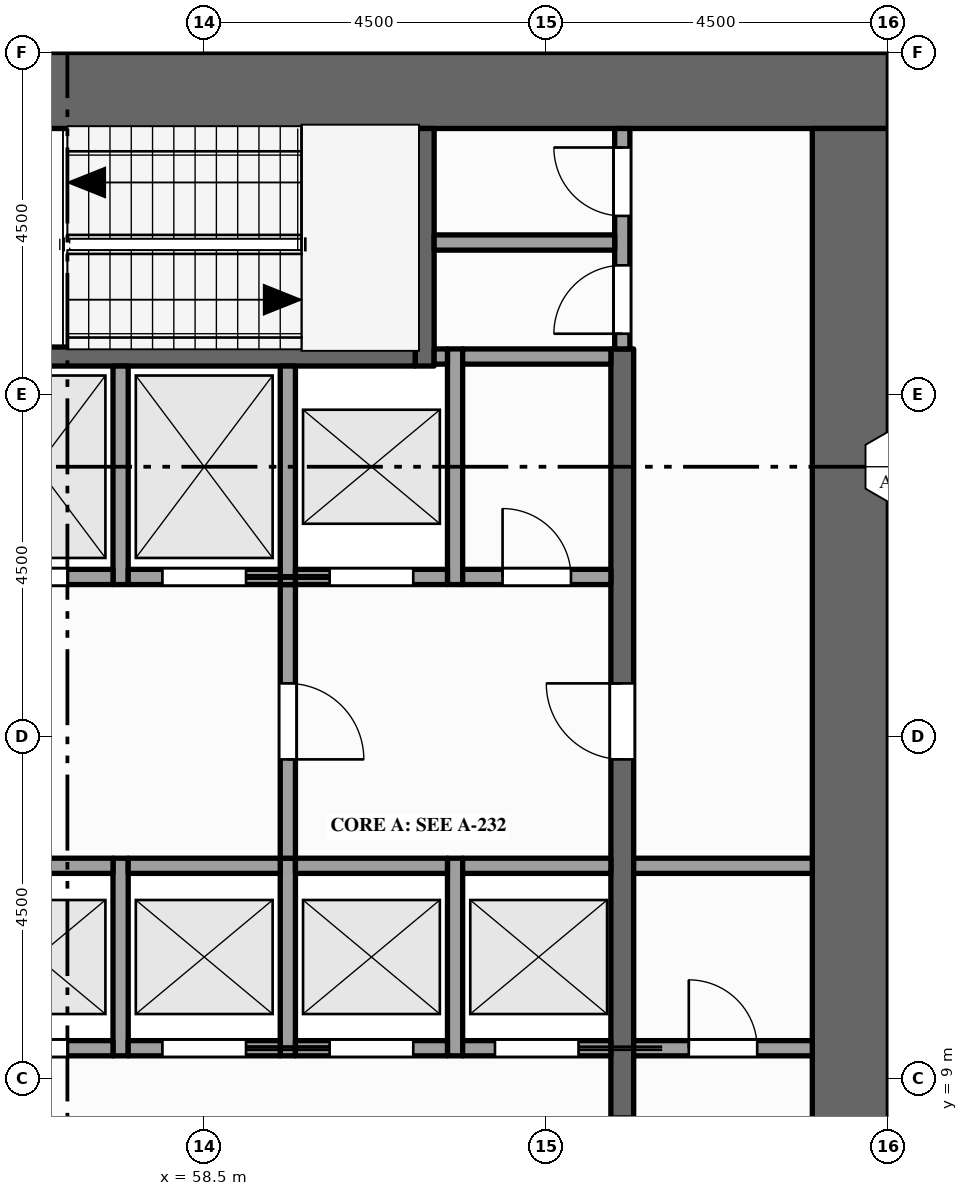
"""IFC4 building model, lengths in metres.
Left out: names, types, materials, properties, quantities, classifications, styles, units other than length and angle.
Written with IfcOpenShell. Run it as: python <this file> out.ifc"""

import sys

from ifc_helpers import new_model, si_unit, direction, frame, frame_2d, origin, place, context, subcontext, project, spatial, rectangle, extrude, element, fill, save


model = new_model("IFC4")
c1 = context("Model", 3, precision=1e-05, world=origin(), true_north=direction((0.0, 1.0)))
c2 = subcontext(c1, "Body", "Model", "MODEL_VIEW")
j1 = project(units=[si_unit("LENGTHUNIT", "METRE"), si_unit("PLANEANGLEUNIT", "RADIAN")], contexts=[c1])
p1 = place(None, origin())
s1 = spatial("IfcSite", under=j1, at=p1, CompositionType="ELEMENT")
p2 = place(p1, origin())
s2 = spatial("IfcBuilding", under=s1, at=p2, CompositionType="ELEMENT")
p3 = place(p2, frame((0.0, 0.0, 179.0)))
s3 = spatial("IfcBuildingStorey", under=s2, at=p3, CompositionType="ELEMENT", Elevation=179.0)
p4 = place(p3, frame((54.0, 22.0, -0.15), z_axis=(0.0, 0.0, 1.0), x_axis=(1.0, 0.0, 0.0)))
e1 = element("IfcWall", 1, at=p4, inside=s3, PredefinedType="SHEAR", context=c2, shape_type="SweptSolid", body=[
    extrude(rectangle(XDim=13.5, YDim=1.0, at=frame_2d((6.75, 0.0))), origin(), (0.0, 0.0, 1.0), 4.0),
])
p5 = place(p3, frame((67.0, 1.0, -0.15), z_axis=(0.0, 0.0, 1.0), x_axis=(0.0, 1.0, 0.0)))
e2 = element("IfcWall", 2, at=p5, inside=s3, PredefinedType="SHEAR", context=c2, shape_type="SweptSolid", body=[
    extrude(rectangle(XDim=20.5, YDim=1.0, at=frame_2d((10.25, 0.0))), origin(), (0.0, 0.0, 1.0), 4.0),
])
p6 = place(p3, frame((57.4, 9.3, 0.0), z_axis=(0.0, 0.0, 1.0), x_axis=(0.0, 1.0, 0.0)))
e3 = element("IfcWall", 3, at=p6, inside=s3, PredefinedType="SOLIDWALL", context=c2, shape_type="SweptSolid", body=[
    extrude(rectangle(XDim=2.6, YDim=0.2, at=frame_2d((1.3, 0.0))), origin(), (0.0, 0.0, 1.0), 3.85),
])
p7 = place(p3, frame((57.4, 15.5, 0.0), z_axis=(0.0, 0.0, 1.0), x_axis=(0.0, 1.0, 0.0)))
e4 = element("IfcWall", 4, at=p7, inside=s3, PredefinedType="SOLIDWALL", context=c2, shape_type="SweptSolid", body=[
    extrude(rectangle(XDim=2.875, YDim=0.2, at=frame_2d((1.438, 0.0))), origin(), (0.0, 0.0, 1.0), 3.85),
])
p8 = place(p3, frame((59.6, 9.3, 0.0), z_axis=(0.0, 0.0, 1.0), x_axis=(0.0, 1.0, 0.0)))
e5 = element("IfcWall", 5, at=p8, inside=s3, PredefinedType="SOLIDWALL", context=c2, shape_type="SweptSolid", body=[
    extrude(rectangle(XDim=2.6, YDim=0.2, at=frame_2d((1.3, 0.0))), origin(), (0.0, 0.0, 1.0), 3.85),
])
p9 = place(p3, frame((59.6, 11.9, 0.0), z_axis=(0.0, 0.0, 1.0), x_axis=(0.0, 1.0, 0.0)))
e6 = element("IfcWall", 6, at=p9, inside=s3, PredefinedType="PARTITIONING", context=c2, shape_type="SweptSolid", body=[
    extrude(rectangle(XDim=3.6, YDim=0.2, at=frame_2d((1.8, 0.0))), origin(), (0.0, 0.0, 1.0), 3.85),
])
p10 = place(p9, frame((1.3, 0.0, 0.0)))
e7 = element("IfcOpeningElement", 7, at=p10, cuts=e6, PredefinedType="OPENING", context=c2, shape_type="SweptSolid", body=[
    extrude(rectangle(XDim=1.0, YDim=2.1, at=frame_2d((0.5, 1.05))), frame((0.0, 0.11, 0.0), z_axis=(0.0, -1.0, 0.0), x_axis=(1.0, 0.0, 0.0)), (0.0, 0.0, 1.0), 0.22),
])
p11 = place(p3, frame((59.6, 15.5, 0.0), z_axis=(0.0, 0.0, 1.0), x_axis=(0.0, 1.0, 0.0)))
e8 = element("IfcWall", 8, at=p11, inside=s3, PredefinedType="SOLIDWALL", context=c2, shape_type="SweptSolid", body=[
    extrude(rectangle(XDim=2.875, YDim=0.2, at=frame_2d((1.438, 0.0))), origin(), (0.0, 0.0, 1.0), 3.85),
])
p12 = place(p3, frame((61.4, 18.375, 0.0), z_axis=(0.0, 0.0, 1.0), x_axis=(0.0, 1.0, 0.0)))
e9 = element("IfcWall", 9, at=p12, inside=s3, PredefinedType="SHEAR", context=c2, shape_type="SweptSolid", body=[
    extrude(rectangle(XDim=3.125, YDim=0.25, at=frame_2d((1.562, 0.0))), origin(), (0.0, 0.0, 1.0), 3.85),
])
p13 = place(p3, frame((61.8, 9.3, 0.0), z_axis=(0.0, 0.0, 1.0), x_axis=(0.0, 1.0, 0.0)))
e10 = element("IfcWall", 10, at=p13, inside=s3, PredefinedType="SOLIDWALL", context=c2, shape_type="SweptSolid", body=[
    extrude(rectangle(XDim=2.6, YDim=0.2, at=frame_2d((1.3, 0.0))), origin(), (0.0, 0.0, 1.0), 3.85),
])
p14 = place(p3, frame((61.8, 15.5, 0.0), z_axis=(0.0, 0.0, 1.0), x_axis=(0.0, 1.0, 0.0)))
e11 = element("IfcWall", 11, at=p14, inside=s3, PredefinedType="SOLIDWALL", context=c2, shape_type="SweptSolid", body=[
    extrude(rectangle(XDim=3.1, YDim=0.2, at=frame_2d((1.55, 0.0))), origin(), (0.0, 0.0, 1.0), 3.85),
])
p15 = place(p3, frame((64.0, 4.1, 0.0), z_axis=(0.0, 0.0, 1.0), x_axis=(0.0, 1.0, 0.0)))
e12 = element("IfcWall", 12, at=p15, inside=s3, PredefinedType="SHEAR", context=c2, shape_type="SweptSolid", body=[
    extrude(rectangle(XDim=14.5, YDim=0.3, at=frame_2d((7.25, 0.0))), origin(), (0.0, 0.0, 1.0), 3.85),
])
p16 = place(p15, frame((3.4, 0.0, 0.0)))
e13 = element("IfcOpeningElement", 13, at=p16, cuts=e12, PredefinedType="OPENING", context=c2, shape_type="SweptSolid", body=[
    extrude(rectangle(XDim=1.0, YDim=2.1, at=frame_2d((0.5, 1.05))), frame((0.0, 0.16, 0.0), z_axis=(0.0, -1.0, 0.0), x_axis=(1.0, 0.0, 0.0)), (0.0, 0.0, 1.0), 0.32),
])
p17 = place(p15, frame((9.1, 0.0, 0.0)))
e14 = element("IfcOpeningElement", 14, at=p17, cuts=e12, PredefinedType="OPENING", context=c2, shape_type="SweptSolid", body=[
    extrude(rectangle(XDim=1.0, YDim=2.1, at=frame_2d((0.5, 1.05))), frame((0.0, 0.16, 0.0), z_axis=(0.0, -1.0, 0.0), x_axis=(1.0, 0.0, 0.0)), (0.0, 0.0, 1.0), 0.32),
])
p18 = place(p3, frame((64.0, 18.6, 0.0), z_axis=(0.0, 0.0, 1.0), x_axis=(0.0, 1.0, 0.0)))
e15 = element("IfcWall", 15, at=p18, inside=s3, PredefinedType="PARTITIONING", context=c2, shape_type="SweptSolid", body=[
    extrude(rectangle(XDim=2.9, YDim=0.2, at=frame_2d((1.45, 0.0))), origin(), (0.0, 0.0, 1.0), 3.85),
])
p19 = place(p18, frame((0.2, 0.0, 0.0)))
e16 = element("IfcOpeningElement", 16, at=p19, cuts=e15, PredefinedType="OPENING", context=c2, shape_type="SweptSolid", body=[
    extrude(rectangle(XDim=0.9, YDim=2.1, at=frame_2d((0.45, 1.05))), frame((0.0, 0.11, 0.0), z_axis=(0.0, -1.0, 0.0), x_axis=(1.0, 0.0, 0.0)), (0.0, 0.0, 1.0), 0.22),
])
p20 = place(p18, frame((1.75, 0.0, 0.0)))
e17 = element("IfcOpeningElement", 17, at=p20, cuts=e15, PredefinedType="OPENING", context=c2, shape_type="SweptSolid", body=[
    extrude(rectangle(XDim=0.9, YDim=2.1, at=frame_2d((0.45, 1.05))), frame((0.0, 0.11, 0.0), z_axis=(0.0, -1.0, 0.0), x_axis=(1.0, 0.0, 0.0)), (0.0, 0.0, 1.0), 0.22),
])
p21 = place(p3, frame((55.0, 9.4, 0.0), z_axis=(0.0, 0.0, 1.0), x_axis=(1.0, 0.0, 0.0)))
e18 = element("IfcWall", 18, at=p21, inside=s3, PredefinedType="SOLIDWALL", context=c2, shape_type="SweptSolid", body=[
    extrude(rectangle(XDim=2.3, YDim=0.2, at=frame_2d((1.15, 0.0))), origin(), (0.0, 0.0, 1.0), 3.85),
])
p22 = place(p21, frame((0.6, 0.0, 0.012)))
e19 = element("IfcOpeningElement", 19, at=p22, cuts=e18, PredefinedType="OPENING", context=c2, shape_type="SweptSolid", body=[
    extrude(rectangle(XDim=1.1, YDim=2.1, at=frame_2d((0.55, 1.05))), frame((0.0, 0.11, 0.0), z_axis=(0.0, -1.0, 0.0), x_axis=(1.0, 0.0, 0.0)), (0.0, 0.0, 1.0), 0.22),
])
p23 = place(p3, frame((57.5, 9.4, 0.0), z_axis=(0.0, 0.0, 1.0), x_axis=(1.0, 0.0, 0.0)))
e20 = element("IfcWall", 20, at=p23, inside=s3, PredefinedType="SOLIDWALL", context=c2, shape_type="SweptSolid", body=[
    extrude(rectangle(XDim=2.0, YDim=0.2, at=frame_2d((1.0, 0.0))), origin(), (0.0, 0.0, 1.0), 3.85),
])
p24 = place(p23, frame((0.45, 0.0, 0.012)))
e21 = element("IfcOpeningElement", 21, at=p24, cuts=e20, PredefinedType="OPENING", context=c2, shape_type="SweptSolid", body=[
    extrude(rectangle(XDim=1.1, YDim=2.1, at=frame_2d((0.55, 1.05))), frame((0.0, 0.11, 0.0), z_axis=(0.0, -1.0, 0.0), x_axis=(1.0, 0.0, 0.0)), (0.0, 0.0, 1.0), 0.22),
])
p25 = place(p3, frame((59.7, 9.4, 0.0), z_axis=(0.0, 0.0, 1.0), x_axis=(1.0, 0.0, 0.0)))
e22 = element("IfcWall", 22, at=p25, inside=s3, PredefinedType="SOLIDWALL", context=c2, shape_type="SweptSolid", body=[
    extrude(rectangle(XDim=2.0, YDim=0.2, at=frame_2d((1.0, 0.0))), origin(), (0.0, 0.0, 1.0), 3.85),
])
p26 = place(p25, frame((0.45, 0.0, 0.012)))
e23 = element("IfcOpeningElement", 23, at=p26, cuts=e22, PredefinedType="OPENING", context=c2, shape_type="SweptSolid", body=[
    extrude(rectangle(XDim=1.1, YDim=2.1, at=frame_2d((0.55, 1.05))), frame((0.0, 0.11, 0.0), z_axis=(0.0, -1.0, 0.0), x_axis=(1.0, 0.0, 0.0)), (0.0, 0.0, 1.0), 0.22),
])
p27 = place(p3, frame((61.9, 9.4, 0.0), z_axis=(0.0, 0.0, 1.0), x_axis=(1.0, 0.0, 0.0)))
e24 = element("IfcWall", 24, at=p27, inside=s3, PredefinedType="SOLIDWALL", context=c2, shape_type="SweptSolid", body=[
    extrude(rectangle(XDim=1.95, YDim=0.2, at=frame_2d((0.975, 0.0))), origin(), (0.0, 0.0, 1.0), 3.85),
])
p28 = place(p27, frame((0.425, 0.0, 0.012)))
e25 = element("IfcOpeningElement", 25, at=p28, cuts=e24, PredefinedType="OPENING", context=c2, shape_type="SweptSolid", body=[
    extrude(rectangle(XDim=1.1, YDim=2.1, at=frame_2d((0.55, 1.05))), frame((0.0, 0.11, 0.0), z_axis=(0.0, -1.0, 0.0), x_axis=(1.0, 0.0, 0.0)), (0.0, 0.0, 1.0), 0.22),
])
p29 = place(p3, frame((64.15, 9.4, 0.0), z_axis=(0.0, 0.0, 1.0), x_axis=(1.0, 0.0, 0.0)))
e26 = element("IfcWall", 26, at=p29, inside=s3, PredefinedType="PARTITIONING", context=c2, shape_type="SweptSolid", body=[
    extrude(rectangle(XDim=2.35, YDim=0.2, at=frame_2d((1.175, 0.0))), origin(), (0.0, 0.0, 1.0), 3.85),
])
p30 = place(p29, frame((0.725, 0.0, 0.0)))
e27 = element("IfcOpeningElement", 27, at=p30, cuts=e26, PredefinedType="OPENING", context=c2, shape_type="SweptSolid", body=[
    extrude(rectangle(XDim=0.9, YDim=2.1, at=frame_2d((0.45, 1.05))), frame((0.0, 0.11, 0.0), z_axis=(0.0, -1.0, 0.0), x_axis=(1.0, 0.0, 0.0)), (0.0, 0.0, 1.0), 0.22),
])
p31 = place(p3, frame((55.0, 11.8, 0.0), z_axis=(0.0, 0.0, 1.0), x_axis=(1.0, 0.0, 0.0)))
e28 = element("IfcWall", 28, at=p31, inside=s3, PredefinedType="SOLIDWALL", context=c2, shape_type="SweptSolid", body=[
    extrude(rectangle(XDim=2.3, YDim=0.2, at=frame_2d((1.15, 0.0))), origin(), (0.0, 0.0, 1.0), 3.85),
])
for number, where, z_axis, x_axis in (
    (29, (57.5, 11.8, 0.0), (0.0, 0.0, 1.0), (1.0, 0.0, 0.0)),
    (30, (59.7, 11.8, 0.0), (0.0, 0.0, 1.0), (1.0, 0.0, 0.0)),
):
    element("IfcWall", number, at=place(p3, frame(where, z_axis=z_axis, x_axis=x_axis)), inside=s3, PredefinedType="SOLIDWALL", context=c2, shape_type="SweptSolid", body=[
        extrude(rectangle(XDim=2.0, YDim=0.2, at=frame_2d((1.0, 0.0))), origin(), (0.0, 0.0, 1.0), 3.85),
    ])
p32 = place(p3, frame((61.9, 11.8, 0.0), z_axis=(0.0, 0.0, 1.0), x_axis=(1.0, 0.0, 0.0)))
e31 = element("IfcWall", 31, at=p32, inside=s3, PredefinedType="SOLIDWALL", context=c2, shape_type="SweptSolid", body=[
    extrude(rectangle(XDim=1.95, YDim=0.2, at=frame_2d((0.975, 0.0))), origin(), (0.0, 0.0, 1.0), 3.85),
])
p33 = place(p3, frame((64.15, 11.8, 0.0), z_axis=(0.0, 0.0, 1.0), x_axis=(1.0, 0.0, 0.0)))
e32 = element("IfcWall", 32, at=p33, inside=s3, PredefinedType="PARTITIONING", context=c2, shape_type="SweptSolid", body=[
    extrude(rectangle(XDim=2.35, YDim=0.2, at=frame_2d((1.175, 0.0))), origin(), (0.0, 0.0, 1.0), 3.85),
])
p34 = place(p3, frame((55.0, 15.6, 0.0), z_axis=(0.0, 0.0, 1.0), x_axis=(1.0, 0.0, 0.0)))
e33 = element("IfcWall", 33, at=p34, inside=s3, PredefinedType="SOLIDWALL", context=c2, shape_type="SweptSolid", body=[
    extrude(rectangle(XDim=2.3, YDim=0.2, at=frame_2d((1.15, 0.0))), origin(), (0.0, 0.0, 1.0), 3.85),
])
p35 = place(p34, frame((0.6, 0.0, 0.012)))
e34 = element("IfcOpeningElement", 34, at=p35, cuts=e33, PredefinedType="OPENING", context=c2, shape_type="SweptSolid", body=[
    extrude(rectangle(XDim=1.1, YDim=2.1, at=frame_2d((0.55, 1.05))), frame((0.0, 0.11, 0.0), z_axis=(0.0, -1.0, 0.0), x_axis=(1.0, 0.0, 0.0)), (0.0, 0.0, 1.0), 0.22),
])
p36 = place(p3, frame((57.5, 15.6, 0.0), z_axis=(0.0, 0.0, 1.0), x_axis=(1.0, 0.0, 0.0)))
e35 = element("IfcWall", 35, at=p36, inside=s3, PredefinedType="SOLIDWALL", context=c2, shape_type="SweptSolid", body=[
    extrude(rectangle(XDim=2.0, YDim=0.2, at=frame_2d((1.0, 0.0))), origin(), (0.0, 0.0, 1.0), 3.85),
])
p37 = place(p36, frame((0.45, 0.0, 0.012)))
e36 = element("IfcOpeningElement", 36, at=p37, cuts=e35, PredefinedType="OPENING", context=c2, shape_type="SweptSolid", body=[
    extrude(rectangle(XDim=1.1, YDim=2.1, at=frame_2d((0.55, 1.05))), frame((0.0, 0.11, 0.0), z_axis=(0.0, -1.0, 0.0), x_axis=(1.0, 0.0, 0.0)), (0.0, 0.0, 1.0), 0.22),
])
p38 = place(p3, frame((59.7, 15.6, 0.0), z_axis=(0.0, 0.0, 1.0), x_axis=(1.0, 0.0, 0.0)))
e37 = element("IfcWall", 37, at=p38, inside=s3, PredefinedType="SOLIDWALL", context=c2, shape_type="SweptSolid", body=[
    extrude(rectangle(XDim=2.0, YDim=0.2, at=frame_2d((1.0, 0.0))), origin(), (0.0, 0.0, 1.0), 3.85),
])
p39 = place(p38, frame((0.45, 0.0, 0.012)))
e38 = element("IfcOpeningElement", 38, at=p39, cuts=e37, PredefinedType="OPENING", context=c2, shape_type="SweptSolid", body=[
    extrude(rectangle(XDim=1.1, YDim=2.1, at=frame_2d((0.55, 1.05))), frame((0.0, 0.11, 0.0), z_axis=(0.0, -1.0, 0.0), x_axis=(1.0, 0.0, 0.0)), (0.0, 0.0, 1.0), 0.22),
])
p40 = place(p3, frame((61.9, 15.6, 0.0), z_axis=(0.0, 0.0, 1.0), x_axis=(1.0, 0.0, 0.0)))
e39 = element("IfcWall", 39, at=p40, inside=s3, PredefinedType="PARTITIONING", context=c2, shape_type="SweptSolid", body=[
    extrude(rectangle(XDim=1.95, YDim=0.2, at=frame_2d((0.975, 0.0))), origin(), (0.0, 0.0, 1.0), 3.85),
])
p41 = place(p40, frame((0.525, 0.0, 0.0)))
e40 = element("IfcOpeningElement", 40, at=p41, cuts=e39, PredefinedType="OPENING", context=c2, shape_type="SweptSolid", body=[
    extrude(rectangle(XDim=0.9, YDim=2.1, at=frame_2d((0.45, 1.05))), frame((0.0, 0.11, 0.0), z_axis=(0.0, -1.0, 0.0), x_axis=(1.0, 0.0, 0.0)), (0.0, 0.0, 1.0), 0.22),
])
p42 = place(p3, frame((55.0, 18.5, 0.0), z_axis=(0.0, 0.0, 1.0), x_axis=(1.0, 0.0, 0.0)))
e41 = element("IfcWall", 41, at=p42, inside=s3, PredefinedType="SHEAR", context=c2, shape_type="SweptSolid", body=[
    extrude(rectangle(XDim=6.275, YDim=0.25, at=frame_2d((3.137, 0.0))), origin(), (0.0, 0.0, 1.0), 3.85),
])
p43 = place(p3, frame((61.525, 18.5, 0.0), z_axis=(0.0, 0.0, 1.0), x_axis=(1.0, 0.0, 0.0)))
e42 = element("IfcWall", 42, at=p43, inside=s3, PredefinedType="SOLIDWALL", context=c2, shape_type="SweptSolid", body=[
    extrude(rectangle(XDim=0.175, YDim=0.2, at=frame_2d((0.087, 0.0))), origin(), (0.0, 0.0, 1.0), 3.85),
])
p44 = place(p3, frame((61.9, 18.5, 0.0), z_axis=(0.0, 0.0, 1.0), x_axis=(1.0, 0.0, 0.0)))
e43 = element("IfcWall", 43, at=p44, inside=s3, PredefinedType="PARTITIONING", context=c2, shape_type="SweptSolid", body=[
    extrude(rectangle(XDim=1.95, YDim=0.2, at=frame_2d((0.975, 0.0))), origin(), (0.0, 0.0, 1.0), 3.85),
])
p45 = place(p3, frame((61.525, 20.0, 0.0), z_axis=(0.0, 0.0, 1.0), x_axis=(1.0, 0.0, 0.0)))
e44 = element("IfcWall", 44, at=p45, inside=s3, PredefinedType="PARTITIONING", context=c2, shape_type="SweptSolid", body=[
    extrude(rectangle(XDim=2.375, YDim=0.2, at=frame_2d((1.188, 0.0))), origin(), (0.0, 0.0, 1.0), 3.85),
])
p46 = place(p22, origin())
e45 = element("IfcDoor", 45, at=p46, inside=s3, OperationType="SLIDING_TO_LEFT", PredefinedType="DOOR", context=c2, shape_type="SweptSolid", body=[
    extrude(rectangle(XDim=1.1, YDim=2.1, at=frame_2d((0.55, 1.05))), frame((0.0, 0.025, 0.0), z_axis=(0.0, -1.0, 0.0), x_axis=(1.0, 0.0, 0.0)), (0.0, 0.0, 1.0), 0.05),
])
fill(e19, e45)
p47 = place(p24, origin())
e46 = element("IfcDoor", 46, at=p47, inside=s3, OperationType="SLIDING_TO_RIGHT", PredefinedType="DOOR", context=c2, shape_type="SweptSolid", body=[
    extrude(rectangle(XDim=1.1, YDim=2.1, at=frame_2d((0.55, 1.05))), frame((0.0, 0.025, 0.0), z_axis=(0.0, -1.0, 0.0), x_axis=(1.0, 0.0, 0.0)), (0.0, 0.0, 1.0), 0.05),
])
fill(e21, e46)
p48 = place(p26, origin())
e47 = element("IfcDoor", 47, at=p48, inside=s3, OperationType="SLIDING_TO_LEFT", PredefinedType="DOOR", context=c2, shape_type="SweptSolid", body=[
    extrude(rectangle(XDim=1.1, YDim=2.1, at=frame_2d((0.55, 1.05))), frame((0.0, 0.025, 0.0), z_axis=(0.0, -1.0, 0.0), x_axis=(1.0, 0.0, 0.0)), (0.0, 0.0, 1.0), 0.05),
])
fill(e23, e47)
p49 = place(p28, origin())
e48 = element("IfcDoor", 48, at=p49, inside=s3, OperationType="SLIDING_TO_RIGHT", PredefinedType="DOOR", context=c2, shape_type="SweptSolid", body=[
    extrude(rectangle(XDim=1.1, YDim=2.1, at=frame_2d((0.55, 1.05))), frame((0.0, 0.025, 0.0), z_axis=(0.0, -1.0, 0.0), x_axis=(1.0, 0.0, 0.0)), (0.0, 0.0, 1.0), 0.05),
])
fill(e25, e48)
p50 = place(p35, origin())
e49 = element("IfcDoor", 49, at=p50, inside=s3, OperationType="SLIDING_TO_LEFT", PredefinedType="DOOR", context=c2, shape_type="SweptSolid", body=[
    extrude(rectangle(XDim=1.1, YDim=2.1, at=frame_2d((0.55, 1.05))), frame((0.0, 0.025, 0.0), z_axis=(0.0, -1.0, 0.0), x_axis=(1.0, 0.0, 0.0)), (0.0, 0.0, 1.0), 0.05),
])
fill(e34, e49)
p51 = place(p37, origin())
e50 = element("IfcDoor", 50, at=p51, inside=s3, OperationType="SLIDING_TO_RIGHT", PredefinedType="DOOR", context=c2, shape_type="SweptSolid", body=[
    extrude(rectangle(XDim=1.1, YDim=2.1, at=frame_2d((0.55, 1.05))), frame((0.0, 0.025, 0.0), z_axis=(0.0, -1.0, 0.0), x_axis=(1.0, 0.0, 0.0)), (0.0, 0.0, 1.0), 0.05),
])
fill(e36, e50)
p52 = place(p39, origin())
e51 = element("IfcDoor", 51, at=p52, inside=s3, OperationType="SLIDING_TO_LEFT", PredefinedType="DOOR", context=c2, shape_type="SweptSolid", body=[
    extrude(rectangle(XDim=1.1, YDim=2.1, at=frame_2d((0.55, 1.05))), frame((0.0, 0.025, 0.0), z_axis=(0.0, -1.0, 0.0), x_axis=(1.0, 0.0, 0.0)), (0.0, 0.0, 1.0), 0.05),
])
fill(e38, e51)
p53 = place(p10, origin())
e52 = element("IfcDoor", 52, at=p53, inside=s3, OperationType="SINGLE_SWING_LEFT", PredefinedType="DOOR", context=c2, shape_type="SweptSolid", body=[
    extrude(rectangle(XDim=1.0, YDim=2.1, at=frame_2d((0.5, 1.05))), frame((0.0, 0.025, 0.0), z_axis=(0.0, -1.0, 0.0), x_axis=(1.0, 0.0, 0.0)), (0.0, 0.0, 1.0), 0.05),
])
fill(e7, e52)
p54 = place(p17, origin())
e53 = element("IfcDoor", 53, at=p54, inside=s3, OperationType="SINGLE_SWING_RIGHT", PredefinedType="DOOR", context=c2, shape_type="SweptSolid", body=[
    extrude(rectangle(XDim=1.0, YDim=2.1, at=frame_2d((0.5, 1.05))), frame((0.0, 0.025, 0.0), z_axis=(0.0, -1.0, 0.0), x_axis=(1.0, 0.0, 0.0)), (0.0, 0.0, 1.0), 0.05),
])
fill(e14, e53)
p55 = place(p30, origin())
e54 = element("IfcDoor", 54, at=p55, inside=s3, OperationType="SINGLE_SWING_LEFT", PredefinedType="DOOR", context=c2, shape_type="SweptSolid", body=[
    extrude(rectangle(XDim=0.9, YDim=2.1, at=frame_2d((0.45, 1.05))), frame((0.0, 0.025, 0.0), z_axis=(0.0, -1.0, 0.0), x_axis=(1.0, 0.0, 0.0)), (0.0, 0.0, 1.0), 0.05),
])
fill(e27, e54)
p56 = place(p19, origin())
e55 = element("IfcDoor", 55, at=p56, inside=s3, OperationType="SINGLE_SWING_LEFT", PredefinedType="DOOR", context=c2, shape_type="SweptSolid", body=[
    extrude(rectangle(XDim=0.9, YDim=2.1, at=frame_2d((0.45, 1.05))), frame((0.0, 0.025, 0.0), z_axis=(0.0, -1.0, 0.0), x_axis=(1.0, 0.0, 0.0)), (0.0, 0.0, 1.0), 0.05),
])
fill(e16, e55)
p57 = place(p20, origin())
e56 = element("IfcDoor", 56, at=p57, inside=s3, OperationType="SINGLE_SWING_RIGHT", PredefinedType="DOOR", context=c2, shape_type="SweptSolid", body=[
    extrude(rectangle(XDim=0.9, YDim=2.1, at=frame_2d((0.45, 1.05))), frame((0.0, 0.025, 0.0), z_axis=(0.0, -1.0, 0.0), x_axis=(1.0, 0.0, 0.0)), (0.0, 0.0, 1.0), 0.05),
])
fill(e17, e56)
p58 = place(p41, origin())
e57 = element("IfcDoor", 57, at=p58, inside=s3, OperationType="SINGLE_SWING_LEFT", PredefinedType="DOOR", context=c2, shape_type="SweptSolid", body=[
    extrude(rectangle(XDim=0.9, YDim=2.1, at=frame_2d((0.45, 1.05))), frame((0.0, 0.025, 0.0), z_axis=(0.0, -1.0, 0.0), x_axis=(1.0, 0.0, 0.0)), (0.0, 0.0, 1.0), 0.05),
])
fill(e40, e57)
save(model, sys.argv[1])
